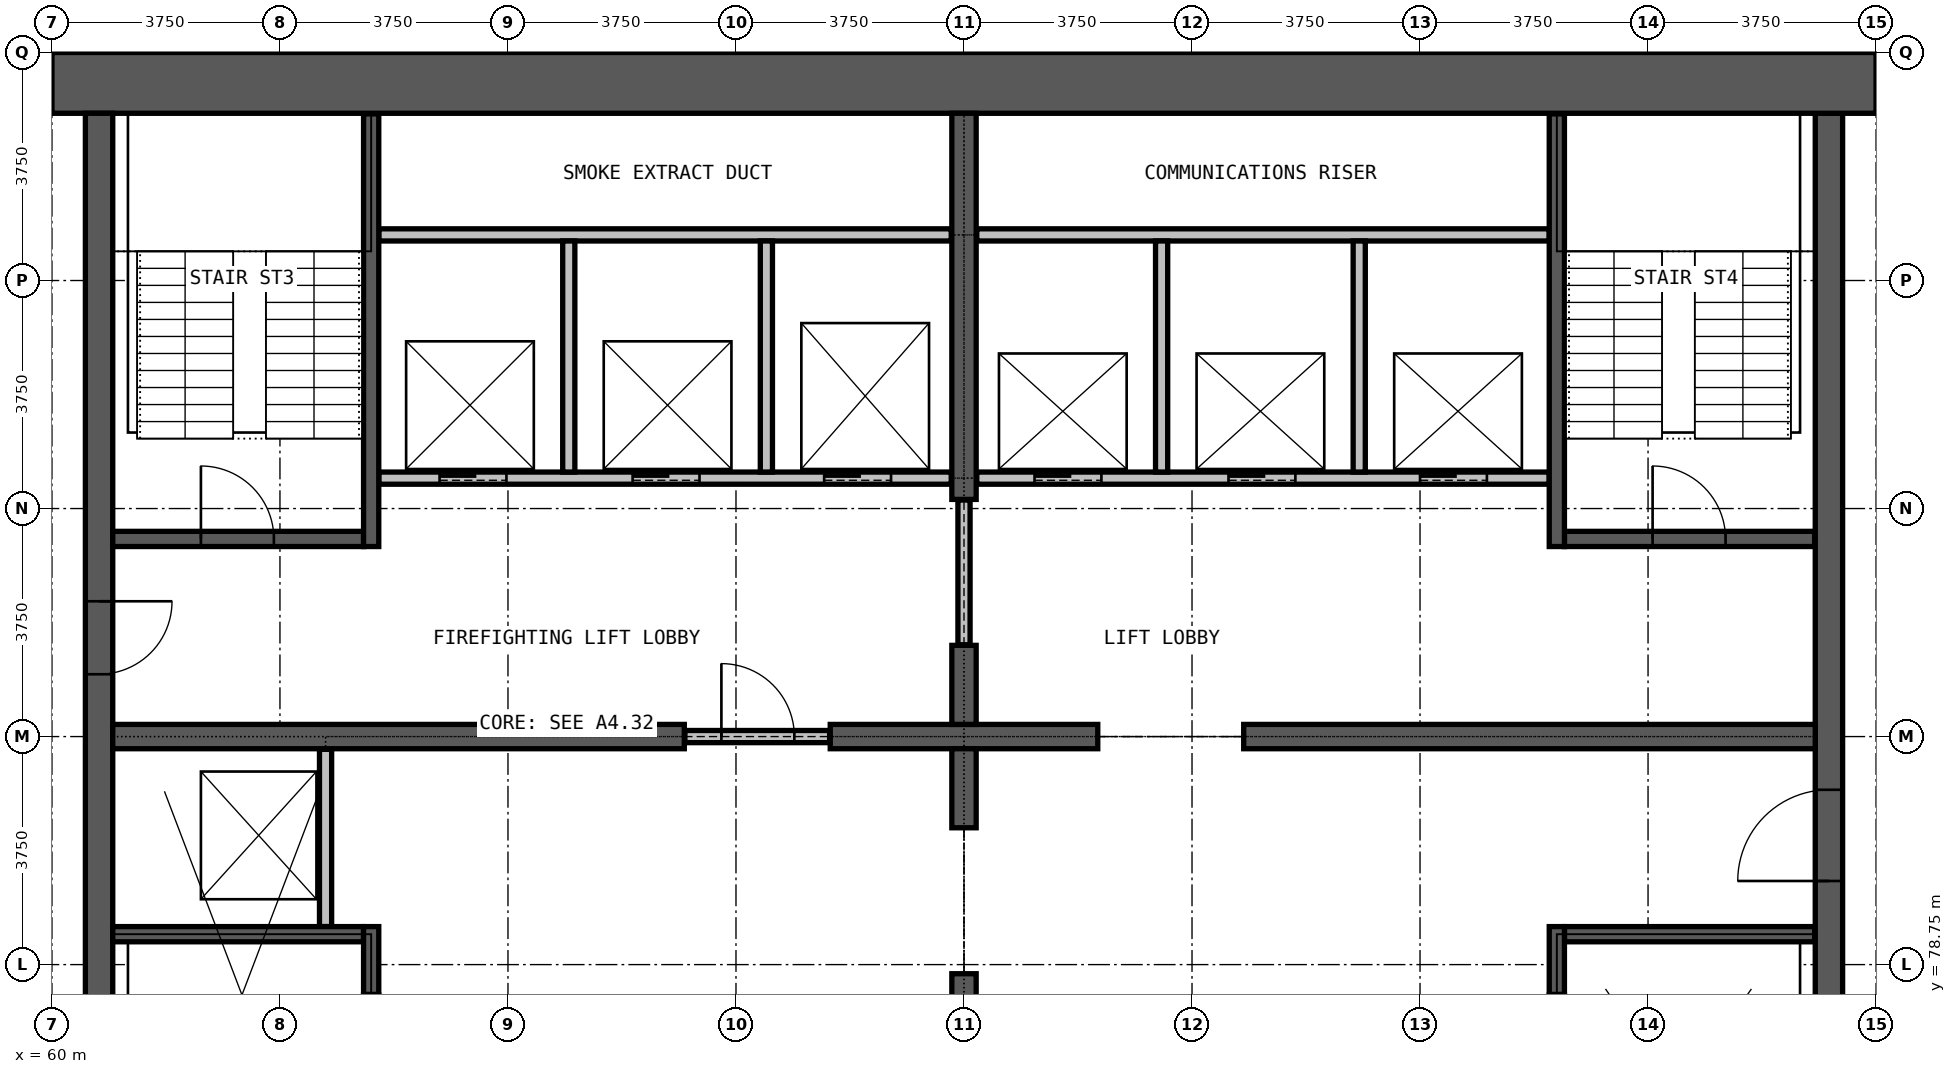
"""IFC4 building model, lengths in metres.
Left out: names, types, materials, properties, quantities, classifications, styles, units other than length and angle.
Written with IfcOpenShell. Run it as: python <this file> out.ifc"""

import sys

from ifc_helpers import new_model, si_unit, direction, frame, frame_2d, origin, place, context, subcontext, project, spatial, rectangle, extrude, element, fill, save


model = new_model("IFC4")
c1 = context("Model", 3, precision=1e-05, world=origin(), true_north=direction((0.0, 1.0)))
c2 = subcontext(c1, "Body", "Model", "MODEL_VIEW")
j1 = project(units=[si_unit("LENGTHUNIT", "METRE"), si_unit("PLANEANGLEUNIT", "RADIAN")], contexts=[c1])
p1 = place(None, origin())
s1 = spatial("IfcSite", under=j1, at=p1, CompositionType="ELEMENT")
p2 = place(p1, origin())
s2 = spatial("IfcBuilding", under=s1, at=p2, CompositionType="ELEMENT")
p3 = place(p2, frame((0.0, 0.0, 283.7)))
s3 = spatial("IfcBuildingStorey", under=s2, at=p3, CompositionType="ELEMENT", Elevation=283.7)
p4 = place(p3, frame((89.225, 72.25, 0.0), z_axis=(0.0, 0.0, 1.0), x_axis=(0.0, 1.0, 0.0)))
e1 = element("IfcWall", 1, at=p4, inside=s3, PredefinedType="SHEAR", context=c2, shape_type="SweptSolid", body=[
    extrude(rectangle(XDim=20.5, YDim=0.45, at=frame_2d((10.25, 0.0))), origin(), (0.0, 0.0, 1.0), 4.0),
])
p5 = place(p4, frame((7.875, 0.0, 0.0)))
e2 = element("IfcOpeningElement", 2, at=p5, cuts=e1, PredefinedType="OPENING", context=c2, shape_type="SweptSolid", body=[
    extrude(rectangle(XDim=1.5, YDim=2.2, at=frame_2d((0.75, 1.1))), frame((0.0, 0.235, 0.0), z_axis=(0.0, -1.0, 0.0), x_axis=(1.0, 0.0, 0.0)), (0.0, 0.0, 1.0), 0.47),
])
p6 = place(p3, frame((90.0, 93.25, 0.0), z_axis=(0.0, 0.0, 1.0), x_axis=(-1.0, 0.0, 0.0)))
e3 = element("IfcWall", 3, at=p6, inside=s3, PredefinedType="SHEAR", context=c2, shape_type="SweptSolid", body=[
    extrude(rectangle(XDim=30.0, YDim=1.0, at=frame_2d((15.0, 0.0))), origin(), (0.0, 0.0, 1.0), 4.0),
])
p7 = place(p3, frame((60.775, 92.75, 0.0), z_axis=(0.0, 0.0, 1.0), x_axis=(0.0, -1.0, 0.0)))
e4 = element("IfcWall", 4, at=p7, inside=s3, PredefinedType="SHEAR", context=c2, shape_type="SweptSolid", body=[
    extrude(rectangle(XDim=20.5, YDim=0.45, at=frame_2d((10.25, 0.0))), origin(), (0.0, 0.0, 1.0), 4.0),
])
p8 = place(p7, frame((8.025, 0.0, 0.0)))
e5 = element("IfcOpeningElement", 5, at=p8, cuts=e4, PredefinedType="OPENING", context=c2, shape_type="SweptSolid", body=[
    extrude(rectangle(XDim=1.2, YDim=2.2, at=frame_2d((0.6, 1.1))), frame((0.0, 0.235, 0.0), z_axis=(0.0, -1.0, 0.0), x_axis=(1.0, 0.0, 0.0)), (0.0, 0.0, 1.0), 0.47),
])
p9 = place(p3, frame((61.0, 82.5, 0.0), z_axis=(0.0, 0.0, 1.0), x_axis=(1.0, 0.0, 0.0)))
e6 = element("IfcWall", 6, at=p9, inside=s3, PredefinedType="SHEAR", context=c2, shape_type="SweptSolid", body=[
    extrude(rectangle(XDim=9.4, YDim=0.4, at=frame_2d((4.7, 0.0))), origin(), (0.0, 0.0, 1.0), 4.0),
])
p10 = place(p3, frame((72.8, 82.5, 0.0), z_axis=(0.0, 0.0, 1.0), x_axis=(1.0, 0.0, 0.0)))
e7 = element("IfcWall", 7, at=p10, inside=s3, PredefinedType="SHEAR", context=c2, shape_type="SweptSolid", body=[
    extrude(rectangle(XDim=4.4, YDim=0.4, at=frame_2d((2.2, 0.0))), origin(), (0.0, 0.0, 1.0), 4.0),
])
p11 = place(p3, frame((79.6, 82.5, 0.0), z_axis=(0.0, 0.0, 1.0), x_axis=(1.0, 0.0, 0.0)))
e8 = element("IfcWall", 8, at=p11, inside=s3, PredefinedType="SHEAR", context=c2, shape_type="SweptSolid", body=[
    extrude(rectangle(XDim=9.4, YDim=0.4, at=frame_2d((4.7, 0.0))), origin(), (0.0, 0.0, 1.0), 4.0),
])
p12 = place(p3, frame((75.0, 72.25, 0.0), z_axis=(0.0, 0.0, 1.0), x_axis=(0.0, 1.0, 0.0)))
e9 = element("IfcWall", 9, at=p12, inside=s3, PredefinedType="SHEAR", context=c2, shape_type="SweptSolid", body=[
    extrude(rectangle(XDim=6.35, YDim=0.4, at=frame_2d((3.175, 0.0))), origin(), (0.0, 0.0, 1.0), 4.0),
])
for number, where, z_axis, x_axis in (
    (10, (75.0, 81.0, 0.0), (0.0, 0.0, 1.0), (0.0, 1.0, 0.0)),
    (11, (75.0, 82.7, 0.0), (0.0, 0.0, 1.0), (0.0, 1.0, 0.0)),
):
    element("IfcWall", number, at=place(p3, frame(where, z_axis=z_axis, x_axis=x_axis)), inside=s3, PredefinedType="SHEAR", context=c2, shape_type="SweptSolid", body=[
        extrude(rectangle(XDim=1.3, YDim=0.4, at=frame_2d((0.65, 0.0))), origin(), (0.0, 0.0, 1.0), 4.0),
    ])
p13 = place(p3, frame((75.0, 86.4, 0.0), z_axis=(0.0, 0.0, 1.0), x_axis=(0.0, 1.0, 0.0)))
e12 = element("IfcWall", 12, at=p13, inside=s3, PredefinedType="SHEAR", context=c2, shape_type="SweptSolid", body=[
    extrude(rectangle(XDim=6.35, YDim=0.4, at=frame_2d((3.175, 0.0))), origin(), (0.0, 0.0, 1.0), 4.0),
])
p14 = place(p3, frame((70.41, 82.5, 0.0), z_axis=(0.0, 0.0, 1.0), x_axis=(1.0, 0.0, 0.0)))
e13 = element("IfcWall", 13, at=p14, inside=s3, PredefinedType="PARTITIONING", context=c2, shape_type="SweptSolid", body=[
    extrude(rectangle(XDim=2.38, YDim=0.2, at=frame_2d((1.19, 0.0))), origin(), (0.0, 0.0, 1.0), 2.4),
])
p15 = place(p14, frame((0.6, 0.0, 0.0)))
e14 = element("IfcOpeningElement", 14, at=p15, cuts=e13, PredefinedType="OPENING", context=c2, shape_type="SweptSolid", body=[
    extrude(rectangle(XDim=1.2, YDim=2.2, at=frame_2d((0.6, 1.1))), frame((0.0, 0.11, 0.0), z_axis=(0.0, -1.0, 0.0), x_axis=(1.0, 0.0, 0.0)), (0.0, 0.0, 1.0), 0.22),
])
p16 = place(p3, frame((75.0, 84.01, 0.0), z_axis=(0.0, 0.0, 1.0), x_axis=(0.0, 1.0, 0.0)))
e15 = element("IfcWall", 15, at=p16, inside=s3, PredefinedType="PARTITIONING", context=c2, shape_type="SweptSolid", body=[
    extrude(rectangle(XDim=2.38, YDim=0.2, at=frame_2d((1.19, 0.0))), origin(), (0.0, 0.0, 1.0), 2.4),
])
p17 = place(p3, frame((65.375, 86.75, 0.0), z_axis=(0.0, 0.0, 1.0), x_axis=(1.0, 0.0, 0.0)))
e16 = element("IfcWall", 16, at=p17, inside=s3, PredefinedType="PARTITIONING", context=c2, shape_type="SweptSolid", body=[
    extrude(rectangle(XDim=9.415, YDim=0.2, at=frame_2d((4.708, 0.0))), origin(), (0.0, 0.0, 1.0), 3.65),
])
p18 = place(p17, frame((1.0, 0.0, 0.0)))
e17 = element("IfcOpeningElement", 17, at=p18, cuts=e16, PredefinedType="OPENING", context=c2, shape_type="SweptSolid", body=[
    extrude(rectangle(XDim=1.1, YDim=2.2, at=frame_2d((0.55, 1.1))), frame((0.0, 0.11, 0.0), z_axis=(0.0, -1.0, 0.0), x_axis=(1.0, 0.0, 0.0)), (0.0, 0.0, 1.0), 0.22),
])
p19 = place(p17, frame((4.175, 0.0, 0.0)))
e18 = element("IfcOpeningElement", 18, at=p19, cuts=e16, PredefinedType="OPENING", context=c2, shape_type="SweptSolid", body=[
    extrude(rectangle(XDim=1.1, YDim=2.2, at=frame_2d((0.55, 1.1))), frame((0.0, 0.11, 0.0), z_axis=(0.0, -1.0, 0.0), x_axis=(1.0, 0.0, 0.0)), (0.0, 0.0, 1.0), 0.22),
])
p20 = place(p17, frame((7.325, 0.0, 0.0)))
e19 = element("IfcOpeningElement", 19, at=p20, cuts=e16, PredefinedType="OPENING", context=c2, shape_type="SweptSolid", body=[
    extrude(rectangle(XDim=1.1, YDim=2.2, at=frame_2d((0.55, 1.1))), frame((0.0, 0.11, 0.0), z_axis=(0.0, -1.0, 0.0), x_axis=(1.0, 0.0, 0.0)), (0.0, 0.0, 1.0), 0.22),
])
p21 = place(p3, frame((75.21, 86.75, 0.0), z_axis=(0.0, 0.0, 1.0), x_axis=(1.0, 0.0, 0.0)))
e20 = element("IfcWall", 20, at=p21, inside=s3, PredefinedType="PARTITIONING", context=c2, shape_type="SweptSolid", body=[
    extrude(rectangle(XDim=9.415, YDim=0.2, at=frame_2d((4.708, 0.0))), origin(), (0.0, 0.0, 1.0), 3.65),
])
p22 = place(p21, frame((0.95, 0.0, 0.0)))
e21 = element("IfcOpeningElement", 21, at=p22, cuts=e20, PredefinedType="OPENING", context=c2, shape_type="SweptSolid", body=[
    extrude(rectangle(XDim=1.1, YDim=2.2, at=frame_2d((0.55, 1.1))), frame((0.0, 0.11, 0.0), z_axis=(0.0, -1.0, 0.0), x_axis=(1.0, 0.0, 0.0)), (0.0, 0.0, 1.0), 0.22),
])
p23 = place(p21, frame((4.14, 0.0, 0.0)))
e22 = element("IfcOpeningElement", 22, at=p23, cuts=e20, PredefinedType="OPENING", context=c2, shape_type="SweptSolid", body=[
    extrude(rectangle(XDim=1.1, YDim=2.2, at=frame_2d((0.55, 1.1))), frame((0.0, 0.11, 0.0), z_axis=(0.0, -1.0, 0.0), x_axis=(1.0, 0.0, 0.0)), (0.0, 0.0, 1.0), 0.22),
])
p24 = place(p21, frame((7.29, 0.0, 0.0)))
e23 = element("IfcOpeningElement", 23, at=p24, cuts=e20, PredefinedType="OPENING", context=c2, shape_type="SweptSolid", body=[
    extrude(rectangle(XDim=1.1, YDim=2.2, at=frame_2d((0.55, 1.1))), frame((0.0, 0.11, 0.0), z_axis=(0.0, -1.0, 0.0), x_axis=(1.0, 0.0, 0.0)), (0.0, 0.0, 1.0), 0.22),
])
for number, where, z_axis, x_axis in (
    (24, (65.375, 90.75, 0.0), (0.0, 0.0, 1.0), (1.0, 0.0, 0.0)),
    (25, (75.21, 90.75, 0.0), (0.0, 0.0, 1.0), (1.0, 0.0, 0.0)),
):
    element("IfcWall", number, at=place(p3, frame(where, z_axis=z_axis, x_axis=x_axis)), inside=s3, PredefinedType="PARTITIONING", context=c2, shape_type="SweptSolid", body=[
        extrude(rectangle(XDim=9.415, YDim=0.2, at=frame_2d((4.708, 0.0))), origin(), (0.0, 0.0, 1.0), 3.65),
    ])
p25 = place(p3, frame((64.5, 79.375, 0.0), z_axis=(0.0, 0.0, 1.0), x_axis=(0.0, 1.0, 0.0)))
e26 = element("IfcWall", 26, at=p25, inside=s3, PredefinedType="PARTITIONING", context=c2, shape_type="SweptSolid", body=[
    extrude(rectangle(XDim=2.915, YDim=0.2, at=frame_2d((1.458, 0.0))), origin(), (0.0, 0.0, 1.0), 3.65),
])
for number, where, z_axis, x_axis in (
    (27, (68.5, 86.85, 0.0), (0.0, 0.0, 1.0), (0.0, 1.0, 0.0)),
    (28, (71.75, 86.85, 0.0), (0.0, 0.0, 1.0), (0.0, 1.0, 0.0)),
    (29, (78.25, 86.85, 0.0), (0.0, 0.0, 1.0), (0.0, 1.0, 0.0)),
    (30, (81.5, 86.85, 0.0), (0.0, 0.0, 1.0), (0.0, 1.0, 0.0)),
):
    element("IfcWall", number, at=place(p3, frame(where, z_axis=z_axis, x_axis=x_axis)), inside=s3, PredefinedType="PARTITIONING", context=c2, shape_type="SweptSolid", body=[
        extrude(rectangle(XDim=3.8, YDim=0.2, at=frame_2d((1.9, 0.0))), origin(), (0.0, 0.0, 1.0), 3.65),
    ])
p26 = place(p3, frame((61.0, 79.25, 0.0), z_axis=(0.0, 0.0, 1.0), x_axis=(1.0, 0.0, 0.0)))
e31 = element("IfcWall", 31, at=p26, inside=s3, PredefinedType="PARTITIONING", context=c2, shape_type="SweptSolid", body=[
    extrude(rectangle(XDim=4.125, YDim=0.25, at=frame_2d((2.062, 0.0))), origin(), (0.0, 0.0, 1.0), 3.65),
])
p27 = place(p3, frame((84.875, 79.25, 0.0), z_axis=(0.0, 0.0, 1.0), x_axis=(1.0, 0.0, 0.0)))
e32 = element("IfcWall", 32, at=p27, inside=s3, PredefinedType="PARTITIONING", context=c2, shape_type="SweptSolid", body=[
    extrude(rectangle(XDim=4.115, YDim=0.25, at=frame_2d((2.058, 0.0))), origin(), (0.0, 0.0, 1.0), 3.65),
])
p28 = place(p3, frame((61.0, 85.75, 0.0), z_axis=(0.0, 0.0, 1.0), x_axis=(1.0, 0.0, 0.0)))
e33 = element("IfcWall", 33, at=p28, inside=s3, PredefinedType="PARTITIONING", context=c2, shape_type="SweptSolid", body=[
    extrude(rectangle(XDim=4.125, YDim=0.25, at=frame_2d((2.062, 0.0))), origin(), (0.0, 0.0, 1.0), 3.65),
])
p29 = place(p28, frame((1.45, 0.0, 0.0)))
e34 = element("IfcOpeningElement", 34, at=p29, cuts=e33, PredefinedType="OPENING", context=c2, shape_type="SweptSolid", body=[
    extrude(rectangle(XDim=1.2, YDim=2.2, at=frame_2d((0.6, 1.1))), frame((0.0, 0.135, 0.0), z_axis=(0.0, -1.0, 0.0), x_axis=(1.0, 0.0, 0.0)), (0.0, 0.0, 1.0), 0.27),
])
p30 = place(p3, frame((84.875, 85.75, 0.0), z_axis=(0.0, 0.0, 1.0), x_axis=(1.0, 0.0, 0.0)))
e35 = element("IfcWall", 35, at=p30, inside=s3, PredefinedType="PARTITIONING", context=c2, shape_type="SweptSolid", body=[
    extrude(rectangle(XDim=4.115, YDim=0.25, at=frame_2d((2.058, 0.0))), origin(), (0.0, 0.0, 1.0), 3.65),
])
p31 = place(p30, frame((1.45, 0.0, 0.0)))
e36 = element("IfcOpeningElement", 36, at=p31, cuts=e35, PredefinedType="OPENING", context=c2, shape_type="SweptSolid", body=[
    extrude(rectangle(XDim=1.2, YDim=2.2, at=frame_2d((0.6, 1.1))), frame((0.0, 0.135, 0.0), z_axis=(0.0, -1.0, 0.0), x_axis=(1.0, 0.0, 0.0)), (0.0, 0.0, 1.0), 0.27),
])
p32 = place(p3, frame((65.25, 72.26, 0.0), z_axis=(0.0, 0.0, 1.0), x_axis=(0.0, 1.0, 0.0)))
e37 = element("IfcWall", 37, at=p32, inside=s3, PredefinedType="PARTITIONING", context=c2, shape_type="SweptSolid", body=[
    extrude(rectangle(XDim=5.99, YDim=0.25, at=frame_2d((2.995, 0.0))), origin(), (0.0, 0.0, 1.0), 3.65),
])
p33 = place(p32, frame((0.35, 0.0, 0.0)))
e38 = element("IfcOpeningElement", 38, at=p33, cuts=e37, PredefinedType="OPENING", context=c2, shape_type="SweptSolid", body=[
    extrude(rectangle(XDim=1.2, YDim=2.2, at=frame_2d((0.6, 1.1))), frame((0.0, 0.135, 0.0), z_axis=(0.0, -1.0, 0.0), x_axis=(1.0, 0.0, 0.0)), (0.0, 0.0, 1.0), 0.27),
])
p34 = place(p3, frame((65.25, 78.26, 0.0), z_axis=(0.0, 0.0, 1.0), x_axis=(0.0, 1.0, 0.0)))
e39 = element("IfcWall", 39, at=p34, inside=s3, PredefinedType="PARTITIONING", context=c2, shape_type="SweptSolid", body=[
    extrude(rectangle(XDim=1.115, YDim=0.25, at=frame_2d((0.558, 0.0))), origin(), (0.0, 0.0, 1.0), 3.65),
])
p35 = place(p3, frame((65.25, 85.625, 0.0), z_axis=(0.0, 0.0, 1.0), x_axis=(0.0, 1.0, 0.0)))
e40 = element("IfcWall", 40, at=p35, inside=s3, PredefinedType="PARTITIONING", context=c2, shape_type="SweptSolid", body=[
    extrude(rectangle(XDim=7.115, YDim=0.25, at=frame_2d((3.558, 0.0))), origin(), (0.0, 0.0, 1.0), 3.65),
])
p36 = place(p3, frame((84.75, 72.26, 0.0), z_axis=(0.0, 0.0, 1.0), x_axis=(0.0, 1.0, 0.0)))
e41 = element("IfcWall", 41, at=p36, inside=s3, PredefinedType="PARTITIONING", context=c2, shape_type="SweptSolid", body=[
    extrude(rectangle(XDim=5.99, YDim=0.25, at=frame_2d((2.995, 0.0))), origin(), (0.0, 0.0, 1.0), 3.65),
])
p37 = place(p36, frame((0.35, 0.0, 0.0)))
e42 = element("IfcOpeningElement", 42, at=p37, cuts=e41, PredefinedType="OPENING", context=c2, shape_type="SweptSolid", body=[
    extrude(rectangle(XDim=1.2, YDim=2.2, at=frame_2d((0.6, 1.1))), frame((0.0, 0.135, 0.0), z_axis=(0.0, -1.0, 0.0), x_axis=(1.0, 0.0, 0.0)), (0.0, 0.0, 1.0), 0.27),
])
p38 = place(p3, frame((84.75, 78.26, 0.0), z_axis=(0.0, 0.0, 1.0), x_axis=(0.0, 1.0, 0.0)))
e43 = element("IfcWall", 43, at=p38, inside=s3, PredefinedType="PARTITIONING", context=c2, shape_type="SweptSolid", body=[
    extrude(rectangle(XDim=1.115, YDim=0.25, at=frame_2d((0.558, 0.0))), origin(), (0.0, 0.0, 1.0), 3.65),
])
p39 = place(p3, frame((84.75, 85.625, 0.0), z_axis=(0.0, 0.0, 1.0), x_axis=(0.0, 1.0, 0.0)))
e44 = element("IfcWall", 44, at=p39, inside=s3, PredefinedType="PARTITIONING", context=c2, shape_type="SweptSolid", body=[
    extrude(rectangle(XDim=7.115, YDim=0.25, at=frame_2d((3.558, 0.0))), origin(), (0.0, 0.0, 1.0), 3.65),
])
p40 = place(p22, origin())
e45 = element("IfcDoor", 45, at=p40, inside=s3, OperationType="DOUBLE_DOOR_SLIDING", PredefinedType="DOOR", context=c2, shape_type="SweptSolid", body=[
    extrude(rectangle(XDim=1.1, YDim=2.2, at=frame_2d((0.55, 1.1))), frame((0.0, 0.025, 0.0), z_axis=(0.0, -1.0, 0.0), x_axis=(1.0, 0.0, 0.0)), (0.0, 0.0, 1.0), 0.05),
])
fill(e21, e45)
p41 = place(p23, origin())
e46 = element("IfcDoor", 46, at=p41, inside=s3, OperationType="DOUBLE_DOOR_SLIDING", PredefinedType="DOOR", context=c2, shape_type="SweptSolid", body=[
    extrude(rectangle(XDim=1.1, YDim=2.2, at=frame_2d((0.55, 1.1))), frame((0.0, 0.025, 0.0), z_axis=(0.0, -1.0, 0.0), x_axis=(1.0, 0.0, 0.0)), (0.0, 0.0, 1.0), 0.05),
])
fill(e22, e46)
p42 = place(p24, origin())
e47 = element("IfcDoor", 47, at=p42, inside=s3, OperationType="DOUBLE_DOOR_SLIDING", PredefinedType="DOOR", context=c2, shape_type="SweptSolid", body=[
    extrude(rectangle(XDim=1.1, YDim=2.2, at=frame_2d((0.55, 1.1))), frame((0.0, 0.025, 0.0), z_axis=(0.0, -1.0, 0.0), x_axis=(1.0, 0.0, 0.0)), (0.0, 0.0, 1.0), 0.05),
])
fill(e23, e47)
p43 = place(p18, origin())
e48 = element("IfcDoor", 48, at=p43, inside=s3, OperationType="DOUBLE_DOOR_SLIDING", PredefinedType="DOOR", context=c2, shape_type="SweptSolid", body=[
    extrude(rectangle(XDim=1.1, YDim=2.2, at=frame_2d((0.55, 1.1))), frame((0.0, 0.025, 0.0), z_axis=(0.0, -1.0, 0.0), x_axis=(1.0, 0.0, 0.0)), (0.0, 0.0, 1.0), 0.05),
])
fill(e17, e48)
p44 = place(p19, origin())
e49 = element("IfcDoor", 49, at=p44, inside=s3, OperationType="DOUBLE_DOOR_SLIDING", PredefinedType="DOOR", context=c2, shape_type="SweptSolid", body=[
    extrude(rectangle(XDim=1.1, YDim=2.2, at=frame_2d((0.55, 1.1))), frame((0.0, 0.025, 0.0), z_axis=(0.0, -1.0, 0.0), x_axis=(1.0, 0.0, 0.0)), (0.0, 0.0, 1.0), 0.05),
])
fill(e18, e49)
p45 = place(p20, origin())
e50 = element("IfcDoor", 50, at=p45, inside=s3, OperationType="DOUBLE_DOOR_SLIDING", PredefinedType="DOOR", context=c2, shape_type="SweptSolid", body=[
    extrude(rectangle(XDim=1.1, YDim=2.2, at=frame_2d((0.55, 1.1))), frame((0.0, 0.025, 0.0), z_axis=(0.0, -1.0, 0.0), x_axis=(1.0, 0.0, 0.0)), (0.0, 0.0, 1.0), 0.05),
])
fill(e19, e50)
p46 = place(p15, origin())
e51 = element("IfcDoor", 51, at=p46, inside=s3, OperationType="SINGLE_SWING_LEFT", PredefinedType="DOOR", context=c2, shape_type="SweptSolid", body=[
    extrude(rectangle(XDim=1.2, YDim=2.2, at=frame_2d((0.6, 1.1))), frame((0.0, 0.025, 0.0), z_axis=(0.0, -1.0, 0.0), x_axis=(1.0, 0.0, 0.0)), (0.0, 0.0, 1.0), 0.05),
])
fill(e14, e51)
p47 = place(p29, origin())
e52 = element("IfcDoor", 52, at=p47, inside=s3, OperationType="SINGLE_SWING_RIGHT", PredefinedType="DOOR", context=c2, shape_type="SweptSolid", body=[
    extrude(rectangle(XDim=1.2, YDim=2.2, at=frame_2d((0.6, 1.1))), frame((0.0, 0.025, 0.0), z_axis=(0.0, -1.0, 0.0), x_axis=(1.0, 0.0, 0.0)), (0.0, 0.0, 1.0), 0.05),
])
fill(e34, e52)
p48 = place(p31, origin())
e53 = element("IfcDoor", 53, at=p48, inside=s3, OperationType="SINGLE_SWING_RIGHT", PredefinedType="DOOR", context=c2, shape_type="SweptSolid", body=[
    extrude(rectangle(XDim=1.2, YDim=2.2, at=frame_2d((0.6, 1.1))), frame((0.0, 0.025, 0.0), z_axis=(0.0, -1.0, 0.0), x_axis=(1.0, 0.0, 0.0)), (0.0, 0.0, 1.0), 0.05),
])
fill(e36, e53)
p49 = place(p5, origin())
e54 = element("IfcDoor", 54, at=p49, inside=s3, OperationType="DOUBLE_DOOR_SINGLE_SWING", PredefinedType="DOOR", context=c2, shape_type="SweptSolid", body=[
    extrude(rectangle(XDim=1.5, YDim=2.2, at=frame_2d((0.75, 1.1))), frame((0.0, 0.025, 0.0), z_axis=(0.0, -1.0, 0.0), x_axis=(1.0, 0.0, 0.0)), (0.0, 0.0, 1.0), 0.05),
])
fill(e2, e54)
p50 = place(p8, origin())
e55 = element("IfcDoor", 55, at=p50, inside=s3, OperationType="SINGLE_SWING_RIGHT", PredefinedType="DOOR", context=c2, shape_type="SweptSolid", body=[
    extrude(rectangle(XDim=1.2, YDim=2.2, at=frame_2d((0.6, 1.1))), frame((0.0, 0.025, 0.0), z_axis=(0.0, -1.0, 0.0), x_axis=(1.0, 0.0, 0.0)), (0.0, 0.0, 1.0), 0.05),
])
fill(e5, e55)
save(model, sys.argv[1])
